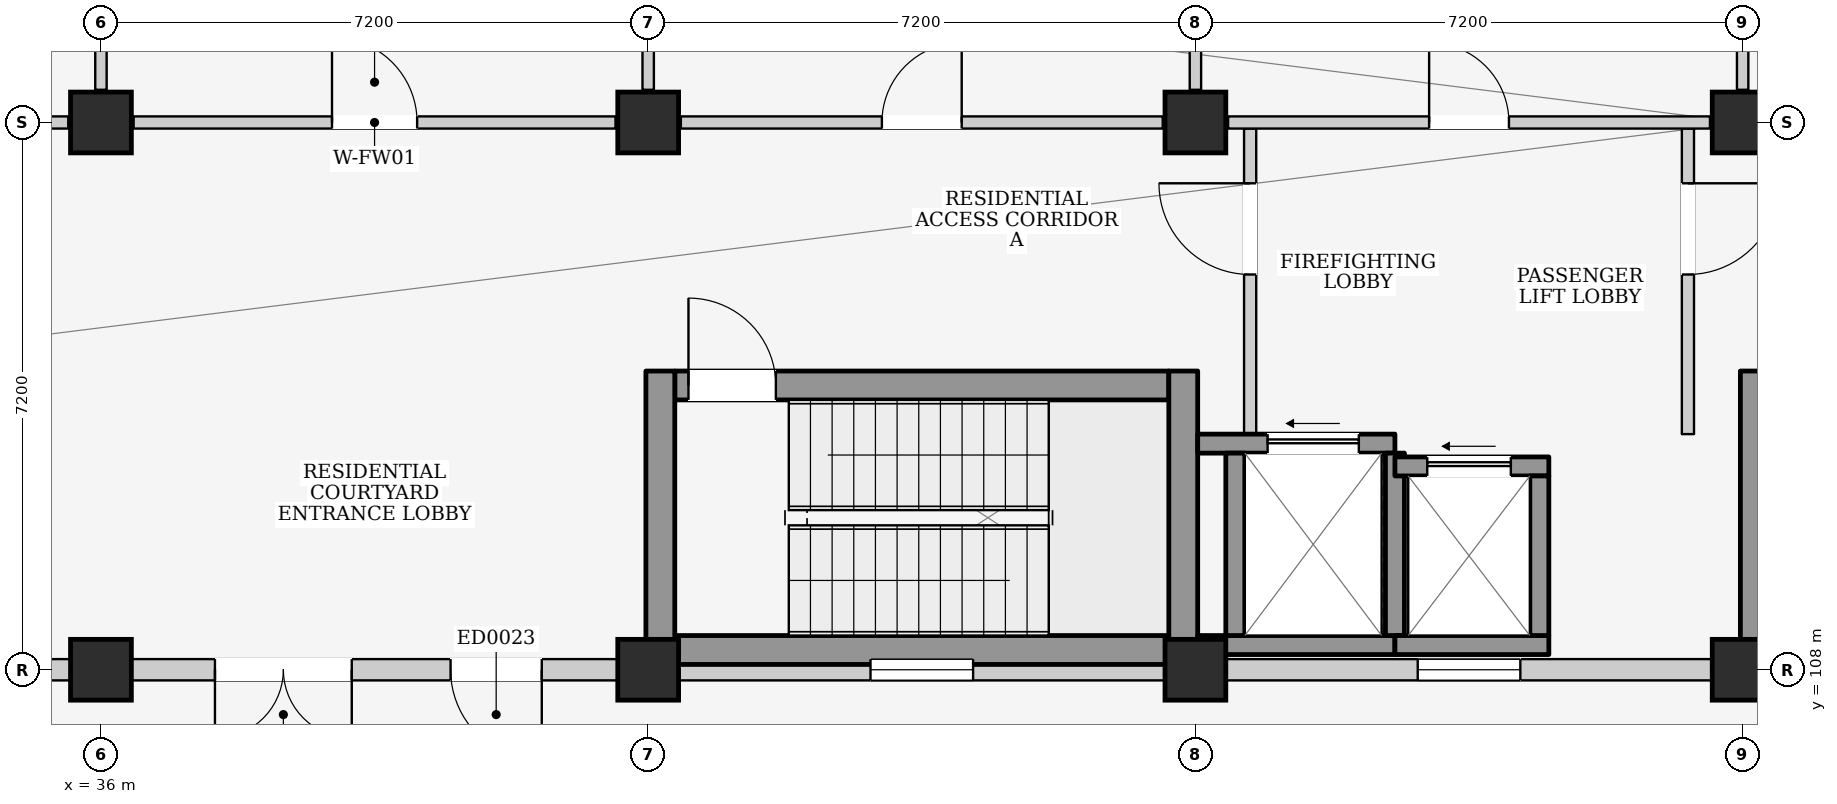
"""IFC4 building model, lengths in metres.
Left out: names, types, materials, properties, quantities, classifications, styles, units other than length and angle.
Written with IfcOpenShell. Run it as: python <this file> out.ifc"""

import sys

from ifc_helpers import new_model, si_unit, direction, frame, frame_2d, origin, origin_2d, place, context, subcontext, project, spatial, rectangle, extrude, element, fill, save


model = new_model("IFC4")
c1 = context("Model", 3, precision=1e-05, world=origin(), true_north=direction((0.0, 1.0)))
c2 = subcontext(c1, "Body", "Model", "MODEL_VIEW")
j1 = project(units=[si_unit("LENGTHUNIT", "METRE"), si_unit("PLANEANGLEUNIT", "RADIAN")], contexts=[c1])
p1 = place(None, origin())
s1 = spatial("IfcSite", under=j1, at=p1, CompositionType="ELEMENT")
p2 = place(p1, origin())
s2 = spatial("IfcBuilding", under=s1, at=p2, CompositionType="ELEMENT")
p3 = place(p2, origin())
s3 = spatial("IfcBuildingStorey", under=s2, at=p3, CompositionType="ELEMENT", Elevation=0.0)
for number, where, z_axis, x_axis in (
    (1, (36.0, 108.0, 0.0), (0.0, 0.0, 1.0), (1.0, 0.0, 0.0)),
    (2, (36.0, 115.2, 0.0), (0.0, 0.0, 1.0), (1.0, 0.0, 0.0)),
    (3, (43.2, 108.0, 0.0), (0.0, 0.0, 1.0), (1.0, 0.0, 0.0)),
    (4, (43.2, 115.2, 0.0), (0.0, 0.0, 1.0), (1.0, 0.0, 0.0)),
    (5, (50.4, 108.0, 0.0), (0.0, 0.0, 1.0), (1.0, 0.0, 0.0)),
    (6, (50.4, 115.2, 0.0), (0.0, 0.0, 1.0), (1.0, 0.0, 0.0)),
    (7, (57.6, 108.0, 0.0), (0.0, 0.0, 1.0), (1.0, 0.0, 0.0)),
    (8, (57.6, 115.2, 0.0), (0.0, 0.0, 1.0), (1.0, 0.0, 0.0)),
):
    element("IfcColumn", number, at=place(p3, frame(where, z_axis=z_axis, x_axis=x_axis)), inside=s3, PredefinedType="COLUMN", context=c2, shape_type="SweptSolid", body=[
        extrude(rectangle(XDim=0.8, YDim=0.8, at=origin_2d()), origin(), (0.0, 0.0, 1.0), 4.5),
    ])
p4 = place(p3, frame((29.2, 108.0, 0.0), z_axis=(0.0, 0.0, 1.0), x_axis=(1.0, 0.0, 0.0)))
e9 = element("IfcWall", 9, at=p4, inside=s3, PredefinedType="ELEMENTEDWALL", context=c2, shape_type="SweptSolid", body=[
    extrude(rectangle(XDim=6.4, YDim=0.28, at=frame_2d((3.2, 0.0))), origin(), (0.0, 0.0, 1.0), 3.435),
])
p5 = place(p4, frame((2.525, 0.0, 0.95)))
e10 = element("IfcOpeningElement", 10, at=p5, cuts=e9, PredefinedType="OPENING", context=c2, shape_type="SweptSolid", body=[
    extrude(rectangle(XDim=1.35, YDim=1.5, at=frame_2d((0.675, 0.75))), frame((0.0, 0.155, 0.0), z_axis=(0.0, -1.0, 0.0), x_axis=(1.0, 0.0, 0.0)), (0.0, 0.0, 1.0), 0.31),
])
p6 = place(p3, frame((36.4, 108.0, 0.0), z_axis=(0.0, 0.0, 1.0), x_axis=(1.0, 0.0, 0.0)))
e11 = element("IfcWall", 11, at=p6, inside=s3, PredefinedType="ELEMENTEDWALL", context=c2, shape_type="SweptSolid", body=[
    extrude(rectangle(XDim=6.4, YDim=0.28, at=frame_2d((3.2, 0.0))), origin(), (0.0, 0.0, 1.0), 3.435),
])
p7 = place(p6, frame((1.1, 0.0, 0.0)))
e12 = element("IfcOpeningElement", 12, at=p7, cuts=e11, PredefinedType="OPENING", context=c2, shape_type="SweptSolid", body=[
    extrude(rectangle(XDim=1.8, YDim=2.4, at=frame_2d((0.9, 1.2))), frame((0.0, 0.155, 0.0), z_axis=(0.0, -1.0, 0.0), x_axis=(1.0, 0.0, 0.0)), (0.0, 0.0, 1.0), 0.31),
])
p8 = place(p6, frame((4.2, 0.0, 0.0)))
e13 = element("IfcOpeningElement", 13, at=p8, cuts=e11, PredefinedType="OPENING", context=c2, shape_type="SweptSolid", body=[
    extrude(rectangle(XDim=1.2, YDim=2.15, at=frame_2d((0.6, 1.075))), frame((0.0, 0.155, 0.0), z_axis=(0.0, -1.0, 0.0), x_axis=(1.0, 0.0, 0.0)), (0.0, 0.0, 1.0), 0.31),
])
p9 = place(p3, frame((43.6, 108.0, 0.0), z_axis=(0.0, 0.0, 1.0), x_axis=(1.0, 0.0, 0.0)))
e14 = element("IfcWall", 14, at=p9, inside=s3, PredefinedType="ELEMENTEDWALL", context=c2, shape_type="SweptSolid", body=[
    extrude(rectangle(XDim=6.4, YDim=0.28, at=frame_2d((3.2, 0.0))), origin(), (0.0, 0.0, 1.0), 3.435),
])
p10 = place(p9, frame((2.525, 0.0, 0.95)))
e15 = element("IfcOpeningElement", 15, at=p10, cuts=e14, PredefinedType="OPENING", context=c2, shape_type="SweptSolid", body=[
    extrude(rectangle(XDim=1.35, YDim=1.5, at=frame_2d((0.675, 0.75))), frame((0.0, 0.155, 0.0), z_axis=(0.0, -1.0, 0.0), x_axis=(1.0, 0.0, 0.0)), (0.0, 0.0, 1.0), 0.31),
])
p11 = place(p3, frame((50.8, 108.0, 0.0), z_axis=(0.0, 0.0, 1.0), x_axis=(1.0, 0.0, 0.0)))
e16 = element("IfcWall", 16, at=p11, inside=s3, PredefinedType="ELEMENTEDWALL", context=c2, shape_type="SweptSolid", body=[
    extrude(rectangle(XDim=6.4, YDim=0.28, at=frame_2d((3.2, 0.0))), origin(), (0.0, 0.0, 1.0), 3.435),
])
p12 = place(p11, frame((2.525, 0.0, 0.95)))
e17 = element("IfcOpeningElement", 17, at=p12, cuts=e16, PredefinedType="OPENING", context=c2, shape_type="SweptSolid", body=[
    extrude(rectangle(XDim=1.35, YDim=1.5, at=frame_2d((0.675, 0.75))), frame((0.0, 0.155, 0.0), z_axis=(0.0, -1.0, 0.0), x_axis=(1.0, 0.0, 0.0)), (0.0, 0.0, 1.0), 0.31),
])
p13 = place(p3, frame((43.55, 108.26, 0.0), z_axis=(0.0, 0.0, 1.0), x_axis=(1.0, 0.0, 0.0)))
e18 = element("IfcWall", 18, at=p13, inside=s3, PredefinedType="SHEAR", context=c2, shape_type="SweptSolid", body=[
    extrude(rectangle(XDim=6.5, YDim=0.38, at=frame_2d((3.25, 0.0))), origin(), (0.0, 0.0, 1.0), 4.2),
])
p14 = place(p3, frame((43.55, 111.74, 0.0), z_axis=(0.0, 0.0, 1.0), x_axis=(1.0, 0.0, 0.0)))
e19 = element("IfcWall", 19, at=p14, inside=s3, PredefinedType="SHEAR", context=c2, shape_type="SweptSolid", body=[
    extrude(rectangle(XDim=6.5, YDim=0.38, at=frame_2d((3.25, 0.0))), origin(), (0.0, 0.0, 1.0), 4.2),
])
p15 = place(p14, frame((0.18, 0.0, 0.0)))
e20 = element("IfcOpeningElement", 20, at=p15, cuts=e19, PredefinedType="OPENING", context=c2, shape_type="SweptSolid", body=[
    extrude(rectangle(XDim=1.15, YDim=2.2, at=frame_2d((0.575, 1.1))), frame((0.0, 0.205, 0.0), z_axis=(0.0, -1.0, 0.0), x_axis=(1.0, 0.0, 0.0)), (0.0, 0.0, 1.0), 0.41),
])
for number, where, z_axis, x_axis in (
    (21, (43.36, 108.07, 0.0), (0.0, 0.0, 1.0), (0.0, 1.0, 0.0)),
    (22, (50.24, 108.07, 0.0), (0.0, 0.0, 1.0), (0.0, 1.0, 0.0)),
):
    element("IfcWall", number, at=place(p3, frame(where, z_axis=z_axis, x_axis=x_axis)), inside=s3, PredefinedType="SHEAR", context=c2, shape_type="SweptSolid", body=[
        extrude(rectangle(XDim=3.86, YDim=0.38, at=frame_2d((1.93, 0.0))), origin(), (0.0, 0.0, 1.0), 4.2),
    ])
p16 = place(p3, frame((51.12, 111.1, 0.0), z_axis=(0.0, 0.0, 1.0), x_axis=(0.0, 1.0, 0.0)))
e23 = element("IfcWall", 23, at=p16, inside=s3, PredefinedType="PARTITIONING", context=c2, shape_type="SweptSolid", body=[
    extrude(rectangle(XDim=4.02, YDim=0.16, at=frame_2d((2.01, 0.0))), origin(), (0.0, 0.0, 1.0), 4.2),
])
p17 = place(p16, frame((2.1, 0.0, 0.0)))
e24 = element("IfcOpeningElement", 24, at=p17, cuts=e23, PredefinedType="OPENING", context=c2, shape_type="SweptSolid", body=[
    extrude(rectangle(XDim=1.2, YDim=2.2, at=frame_2d((0.6, 1.1))), frame((0.0, 0.095, 0.0), z_axis=(0.0, -1.0, 0.0), x_axis=(1.0, 0.0, 0.0)), (0.0, 0.0, 1.0), 0.19),
])
p18 = place(p3, frame((56.88, 111.1, 0.0), z_axis=(0.0, 0.0, 1.0), x_axis=(0.0, 1.0, 0.0)))
e25 = element("IfcWall", 25, at=p18, inside=s3, PredefinedType="PARTITIONING", context=c2, shape_type="SweptSolid", body=[
    extrude(rectangle(XDim=4.02, YDim=0.16, at=frame_2d((2.01, 0.0))), origin(), (0.0, 0.0, 1.0), 4.2),
])
p19 = place(p18, frame((2.1, 0.0, 0.0)))
e26 = element("IfcOpeningElement", 26, at=p19, cuts=e25, PredefinedType="OPENING", context=c2, shape_type="SweptSolid", body=[
    extrude(rectangle(XDim=1.2, YDim=2.2, at=frame_2d((0.6, 1.1))), frame((0.0, 0.095, 0.0), z_axis=(0.0, -1.0, 0.0), x_axis=(1.0, 0.0, 0.0)), (0.0, 0.0, 1.0), 0.19),
])
p20 = place(p3, frame((50.43, 108.325, 0.0), z_axis=(0.0, 0.0, 1.0), x_axis=(1.0, 0.0, 0.0)))
e27 = element("IfcWall", 27, at=p20, inside=s3, PredefinedType="SHEAR", context=c2, shape_type="SweptSolid", body=[
    extrude(rectangle(XDim=2.595, YDim=0.25, at=frame_2d((1.297, 0.0))), origin(), (0.0, 0.0, 1.0), 4.2),
])
p21 = place(p3, frame((50.43, 110.975, 0.0), z_axis=(0.0, 0.0, 1.0), x_axis=(1.0, 0.0, 0.0)))
e28 = element("IfcWall", 28, at=p21, inside=s3, PredefinedType="SHEAR", context=c2, shape_type="SweptSolid", body=[
    extrude(rectangle(XDim=2.595, YDim=0.25, at=frame_2d((1.297, 0.0))), origin(), (0.0, 0.0, 1.0), 4.2),
])
p22 = place(p21, frame((0.92, 0.0, 0.0)))
e29 = element("IfcOpeningElement", 29, at=p22, cuts=e28, PredefinedType="OPENING", context=c2, shape_type="SweptSolid", body=[
    extrude(rectangle(XDim=1.2, YDim=2.25, at=frame_2d((0.6, 1.125))), frame((0.0, 0.14, 0.0), z_axis=(0.0, -1.0, 0.0), x_axis=(1.0, 0.0, 0.0)), (0.0, 0.0, 1.0), 0.28),
])
for number, where, z_axis, x_axis in (
    (30, (50.925, 108.45, 0.0), (0.0, 0.0, 1.0), (0.0, 1.0, 0.0)),
    (31, (53.025, 108.45, 0.0), (0.0, 0.0, 1.0), (0.0, 1.0, 0.0)),
):
    element("IfcWall", number, at=place(p3, frame(where, z_axis=z_axis, x_axis=x_axis)), inside=s3, PredefinedType="SHEAR", context=c2, shape_type="SweptSolid", body=[
        extrude(rectangle(XDim=2.4, YDim=0.25, at=frame_2d((1.2, 0.0))), origin(), (0.0, 0.0, 1.0), 4.2),
    ])
p23 = place(p3, frame((53.025, 108.325, 0.0), z_axis=(0.0, 0.0, 1.0), x_axis=(1.0, 0.0, 0.0)))
e32 = element("IfcWall", 32, at=p23, inside=s3, PredefinedType="SHEAR", context=c2, shape_type="SweptSolid", body=[
    extrude(rectangle(XDim=2.025, YDim=0.25, at=frame_2d((1.013, 0.0))), origin(), (0.0, 0.0, 1.0), 4.2),
])
p24 = place(p3, frame((53.025, 110.675, 0.0), z_axis=(0.0, 0.0, 1.0), x_axis=(1.0, 0.0, 0.0)))
e33 = element("IfcWall", 33, at=p24, inside=s3, PredefinedType="SHEAR", context=c2, shape_type="SweptSolid", body=[
    extrude(rectangle(XDim=2.025, YDim=0.25, at=frame_2d((1.013, 0.0))), origin(), (0.0, 0.0, 1.0), 4.2),
])
p25 = place(p24, frame((0.425, 0.0, 0.0)))
e34 = element("IfcOpeningElement", 34, at=p25, cuts=e33, PredefinedType="OPENING", context=c2, shape_type="SweptSolid", body=[
    extrude(rectangle(XDim=1.1, YDim=2.15, at=frame_2d((0.55, 1.075))), frame((0.0, 0.14, 0.0), z_axis=(0.0, -1.0, 0.0), x_axis=(1.0, 0.0, 0.0)), (0.0, 0.0, 1.0), 0.28),
])
p26 = place(p3, frame((54.925, 108.45, 0.0), z_axis=(0.0, 0.0, 1.0), x_axis=(0.0, 1.0, 0.0)))
e35 = element("IfcWall", 35, at=p26, inside=s3, PredefinedType="SHEAR", context=c2, shape_type="SweptSolid", body=[
    extrude(rectangle(XDim=2.1, YDim=0.25, at=frame_2d((1.05, 0.0))), origin(), (0.0, 0.0, 1.0), 4.2),
])
p27 = place(p3, frame((57.76, 108.07, 0.0), z_axis=(0.0, 0.0, 1.0), x_axis=(0.0, 1.0, 0.0)))
e36 = element("IfcWall", 36, at=p27, inside=s3, PredefinedType="SHEAR", context=c2, shape_type="SweptSolid", body=[
    extrude(rectangle(XDim=3.86, YDim=0.38, at=frame_2d((1.93, 0.0))), origin(), (0.0, 0.0, 1.0), 4.2),
])
p28 = place(p3, frame((29.23, 115.2, 0.0), z_axis=(0.0, 0.0, 1.0), x_axis=(1.0, 0.0, 0.0)))
e37 = element("IfcWall", 37, at=p28, inside=s3, PredefinedType="PARTITIONING", context=c2, shape_type="SweptSolid", body=[
    extrude(rectangle(XDim=6.34, YDim=0.16, at=frame_2d((3.17, 0.0))), origin(), (0.0, 0.0, 1.0), 3.435),
])
p29 = place(p28, frame((2.61, 0.0, 0.0)))
e38 = element("IfcOpeningElement", 38, at=p29, cuts=e37, PredefinedType="OPENING", context=c2, shape_type="SweptSolid", body=[
    extrude(rectangle(XDim=1.12, YDim=2.2, at=frame_2d((0.56, 1.1))), frame((0.0, 0.095, 0.0), z_axis=(0.0, -1.0, 0.0), x_axis=(1.0, 0.0, 0.0)), (0.0, 0.0, 1.0), 0.19),
])
p30 = place(p3, frame((36.0, 115.63, 0.0), z_axis=(0.0, 0.0, 1.0), x_axis=(0.0, 1.0, 0.0)))
e39 = element("IfcWall", 39, at=p30, inside=s3, PredefinedType="PARTITIONING", context=c2, shape_type="SweptSolid", body=[
    extrude(rectangle(XDim=6.34, YDim=0.15, at=frame_2d((3.17, 0.0))), origin(), (0.0, 0.0, 1.0), 3.435),
])
p31 = place(p3, frame((36.43, 115.2, 0.0), z_axis=(0.0, 0.0, 1.0), x_axis=(1.0, 0.0, 0.0)))
e40 = element("IfcWall", 40, at=p31, inside=s3, PredefinedType="PARTITIONING", context=c2, shape_type="SweptSolid", body=[
    extrude(rectangle(XDim=6.34, YDim=0.16, at=frame_2d((3.17, 0.0))), origin(), (0.0, 0.0, 1.0), 3.435),
])
p32 = place(p31, frame((2.61, 0.0, 0.0)))
e41 = element("IfcOpeningElement", 41, at=p32, cuts=e40, PredefinedType="OPENING", context=c2, shape_type="SweptSolid", body=[
    extrude(rectangle(XDim=1.12, YDim=2.2, at=frame_2d((0.56, 1.1))), frame((0.0, 0.095, 0.0), z_axis=(0.0, -1.0, 0.0), x_axis=(1.0, 0.0, 0.0)), (0.0, 0.0, 1.0), 0.19),
])
p33 = place(p3, frame((43.2, 115.63, 0.0), z_axis=(0.0, 0.0, 1.0), x_axis=(0.0, 1.0, 0.0)))
e42 = element("IfcWall", 42, at=p33, inside=s3, PredefinedType="PARTITIONING", context=c2, shape_type="SweptSolid", body=[
    extrude(rectangle(XDim=6.34, YDim=0.15, at=frame_2d((3.17, 0.0))), origin(), (0.0, 0.0, 1.0), 3.435),
])
p34 = place(p3, frame((43.63, 115.2, 0.0), z_axis=(0.0, 0.0, 1.0), x_axis=(1.0, 0.0, 0.0)))
e43 = element("IfcWall", 43, at=p34, inside=s3, PredefinedType="PARTITIONING", context=c2, shape_type="SweptSolid", body=[
    extrude(rectangle(XDim=6.34, YDim=0.16, at=frame_2d((3.17, 0.0))), origin(), (0.0, 0.0, 1.0), 3.435),
])
p35 = place(p34, frame((2.645, 0.0, 0.0)))
e44 = element("IfcOpeningElement", 44, at=p35, cuts=e43, PredefinedType="OPENING", context=c2, shape_type="SweptSolid", body=[
    extrude(rectangle(XDim=1.05, YDim=2.15, at=frame_2d((0.525, 1.075))), frame((0.0, 0.095, 0.0), z_axis=(0.0, -1.0, 0.0), x_axis=(1.0, 0.0, 0.0)), (0.0, 0.0, 1.0), 0.19),
])
p36 = place(p3, frame((50.4, 115.63, 0.0), z_axis=(0.0, 0.0, 1.0), x_axis=(0.0, 1.0, 0.0)))
e45 = element("IfcWall", 45, at=p36, inside=s3, PredefinedType="PARTITIONING", context=c2, shape_type="SweptSolid", body=[
    extrude(rectangle(XDim=6.34, YDim=0.15, at=frame_2d((3.17, 0.0))), origin(), (0.0, 0.0, 1.0), 3.435),
])
p37 = place(p3, frame((50.83, 115.2, 0.0), z_axis=(0.0, 0.0, 1.0), x_axis=(1.0, 0.0, 0.0)))
e46 = element("IfcWall", 46, at=p37, inside=s3, PredefinedType="PARTITIONING", context=c2, shape_type="SweptSolid", body=[
    extrude(rectangle(XDim=6.34, YDim=0.16, at=frame_2d((3.17, 0.0))), origin(), (0.0, 0.0, 1.0), 3.435),
])
p38 = place(p37, frame((2.645, 0.0, 0.0)))
e47 = element("IfcOpeningElement", 47, at=p38, cuts=e46, PredefinedType="OPENING", context=c2, shape_type="SweptSolid", body=[
    extrude(rectangle(XDim=1.05, YDim=2.15, at=frame_2d((0.525, 1.075))), frame((0.0, 0.095, 0.0), z_axis=(0.0, -1.0, 0.0), x_axis=(1.0, 0.0, 0.0)), (0.0, 0.0, 1.0), 0.19),
])
p39 = place(p3, frame((57.6, 115.63, 0.0), z_axis=(0.0, 0.0, 1.0), x_axis=(0.0, 1.0, 0.0)))
e48 = element("IfcWall", 48, at=p39, inside=s3, PredefinedType="PARTITIONING", context=c2, shape_type="SweptSolid", body=[
    extrude(rectangle(XDim=6.34, YDim=0.15, at=frame_2d((3.17, 0.0))), origin(), (0.0, 0.0, 1.0), 3.435),
])
p40 = place(p7, frame((1.8, 0.0, 0.0), z_axis=(0.0, 0.0, 1.0), x_axis=(-1.0, 0.0, 0.0)))
e49 = element("IfcDoor", 49, at=p40, inside=s3, OperationType="DOUBLE_DOOR_SINGLE_SWING", PredefinedType="DOOR", context=c2, shape_type="SweptSolid", body=[
    extrude(rectangle(XDim=1.8, YDim=2.4, at=frame_2d((0.9, 1.2))), frame((0.0, 0.025, 0.0), z_axis=(0.0, -1.0, 0.0), x_axis=(1.0, 0.0, 0.0)), (0.0, 0.0, 1.0), 0.05),
])
fill(e12, e49)
p41 = place(p8, frame((1.2, 0.0, 0.0), z_axis=(0.0, 0.0, 1.0), x_axis=(-1.0, 0.0, 0.0)))
e50 = element("IfcDoor", 50, at=p41, inside=s3, OperationType="SINGLE_SWING_LEFT", PredefinedType="DOOR", context=c2, shape_type="SweptSolid", body=[
    extrude(rectangle(XDim=1.2, YDim=2.15, at=frame_2d((0.6, 1.075))), frame((0.0, 0.025, 0.0), z_axis=(0.0, -1.0, 0.0), x_axis=(1.0, 0.0, 0.0)), (0.0, 0.0, 1.0), 0.05),
])
fill(e13, e50)
p42 = place(p10, origin())
e51 = element("IfcWindow", 51, at=p42, inside=s3, PartitioningType="SINGLE_PANEL", PredefinedType="WINDOW", context=c2, shape_type="SweptSolid", body=[
    extrude(rectangle(XDim=1.35, YDim=1.5, at=frame_2d((0.675, 0.75))), frame((0.0, 0.03, 0.0), z_axis=(0.0, -1.0, 0.0), x_axis=(1.0, 0.0, 0.0)), (0.0, 0.0, 1.0), 0.06),
])
fill(e15, e51)
p43 = place(p12, origin())
e52 = element("IfcWindow", 52, at=p43, inside=s3, PartitioningType="SINGLE_PANEL", PredefinedType="WINDOW", context=c2, shape_type="SweptSolid", body=[
    extrude(rectangle(XDim=1.35, YDim=1.5, at=frame_2d((0.675, 0.75))), frame((0.0, 0.03, 0.0), z_axis=(0.0, -1.0, 0.0), x_axis=(1.0, 0.0, 0.0)), (0.0, 0.0, 1.0), 0.06),
])
fill(e17, e52)
p44 = place(p15, origin())
e53 = element("IfcDoor", 53, at=p44, inside=s3, OperationType="SINGLE_SWING_LEFT", PredefinedType="DOOR", context=c2, shape_type="SweptSolid", body=[
    extrude(rectangle(XDim=1.15, YDim=2.2, at=frame_2d((0.575, 1.1))), frame((0.0, 0.025, 0.0), z_axis=(0.0, -1.0, 0.0), x_axis=(1.0, 0.0, 0.0)), (0.0, 0.0, 1.0), 0.05),
])
fill(e20, e53)
p45 = place(p17, origin())
e54 = element("IfcDoor", 54, at=p45, inside=s3, OperationType="SINGLE_SWING_RIGHT", PredefinedType="DOOR", context=c2, shape_type="SweptSolid", body=[
    extrude(rectangle(XDim=1.2, YDim=2.2, at=frame_2d((0.6, 1.1))), frame((0.0, 0.025, 0.0), z_axis=(0.0, -1.0, 0.0), x_axis=(1.0, 0.0, 0.0)), (0.0, 0.0, 1.0), 0.05),
])
fill(e24, e54)
p46 = place(p19, frame((1.2, 0.0, 0.0), z_axis=(0.0, 0.0, 1.0), x_axis=(-1.0, 0.0, 0.0)))
e55 = element("IfcDoor", 55, at=p46, inside=s3, OperationType="SINGLE_SWING_LEFT", PredefinedType="DOOR", context=c2, shape_type="SweptSolid", body=[
    extrude(rectangle(XDim=1.2, YDim=2.2, at=frame_2d((0.6, 1.1))), frame((0.0, 0.025, 0.0), z_axis=(0.0, -1.0, 0.0), x_axis=(1.0, 0.0, 0.0)), (0.0, 0.0, 1.0), 0.05),
])
fill(e26, e55)
p47 = place(p22, origin())
e56 = element("IfcDoor", 56, at=p47, inside=s3, OperationType="SLIDING_TO_LEFT", PredefinedType="DOOR", context=c2, shape_type="SweptSolid", body=[
    extrude(rectangle(XDim=1.2, YDim=2.25, at=frame_2d((0.6, 1.125))), frame((0.0, 0.025, 0.0), z_axis=(0.0, -1.0, 0.0), x_axis=(1.0, 0.0, 0.0)), (0.0, 0.0, 1.0), 0.05),
])
fill(e29, e56)
p48 = place(p25, origin())
e57 = element("IfcDoor", 57, at=p48, inside=s3, OperationType="SLIDING_TO_LEFT", PredefinedType="DOOR", context=c2, shape_type="SweptSolid", body=[
    extrude(rectangle(XDim=1.1, YDim=2.15, at=frame_2d((0.55, 1.075))), frame((0.0, 0.025, 0.0), z_axis=(0.0, -1.0, 0.0), x_axis=(1.0, 0.0, 0.0)), (0.0, 0.0, 1.0), 0.05),
])
fill(e34, e57)
p49 = place(p32, origin())
e58 = element("IfcDoor", 58, at=p49, inside=s3, OperationType="SINGLE_SWING_LEFT", PredefinedType="DOOR", context=c2, shape_type="SweptSolid", body=[
    extrude(rectangle(XDim=1.12, YDim=2.2, at=frame_2d((0.56, 1.1))), frame((0.0, 0.025, 0.0), z_axis=(0.0, -1.0, 0.0), x_axis=(1.0, 0.0, 0.0)), (0.0, 0.0, 1.0), 0.05),
])
fill(e41, e58)
p50 = place(p35, origin())
e59 = element("IfcDoor", 59, at=p50, inside=s3, OperationType="SINGLE_SWING_RIGHT", PredefinedType="DOOR", context=c2, shape_type="SweptSolid", body=[
    extrude(rectangle(XDim=1.05, YDim=2.15, at=frame_2d((0.525, 1.075))), frame((0.0, 0.025, 0.0), z_axis=(0.0, -1.0, 0.0), x_axis=(1.0, 0.0, 0.0)), (0.0, 0.0, 1.0), 0.05),
])
fill(e44, e59)
p51 = place(p38, origin())
e60 = element("IfcDoor", 60, at=p51, inside=s3, OperationType="SINGLE_SWING_LEFT", PredefinedType="DOOR", context=c2, shape_type="SweptSolid", body=[
    extrude(rectangle(XDim=1.05, YDim=2.15, at=frame_2d((0.525, 1.075))), frame((0.0, 0.025, 0.0), z_axis=(0.0, -1.0, 0.0), x_axis=(1.0, 0.0, 0.0)), (0.0, 0.0, 1.0), 0.05),
])
fill(e47, e60)
save(model, sys.argv[1])
